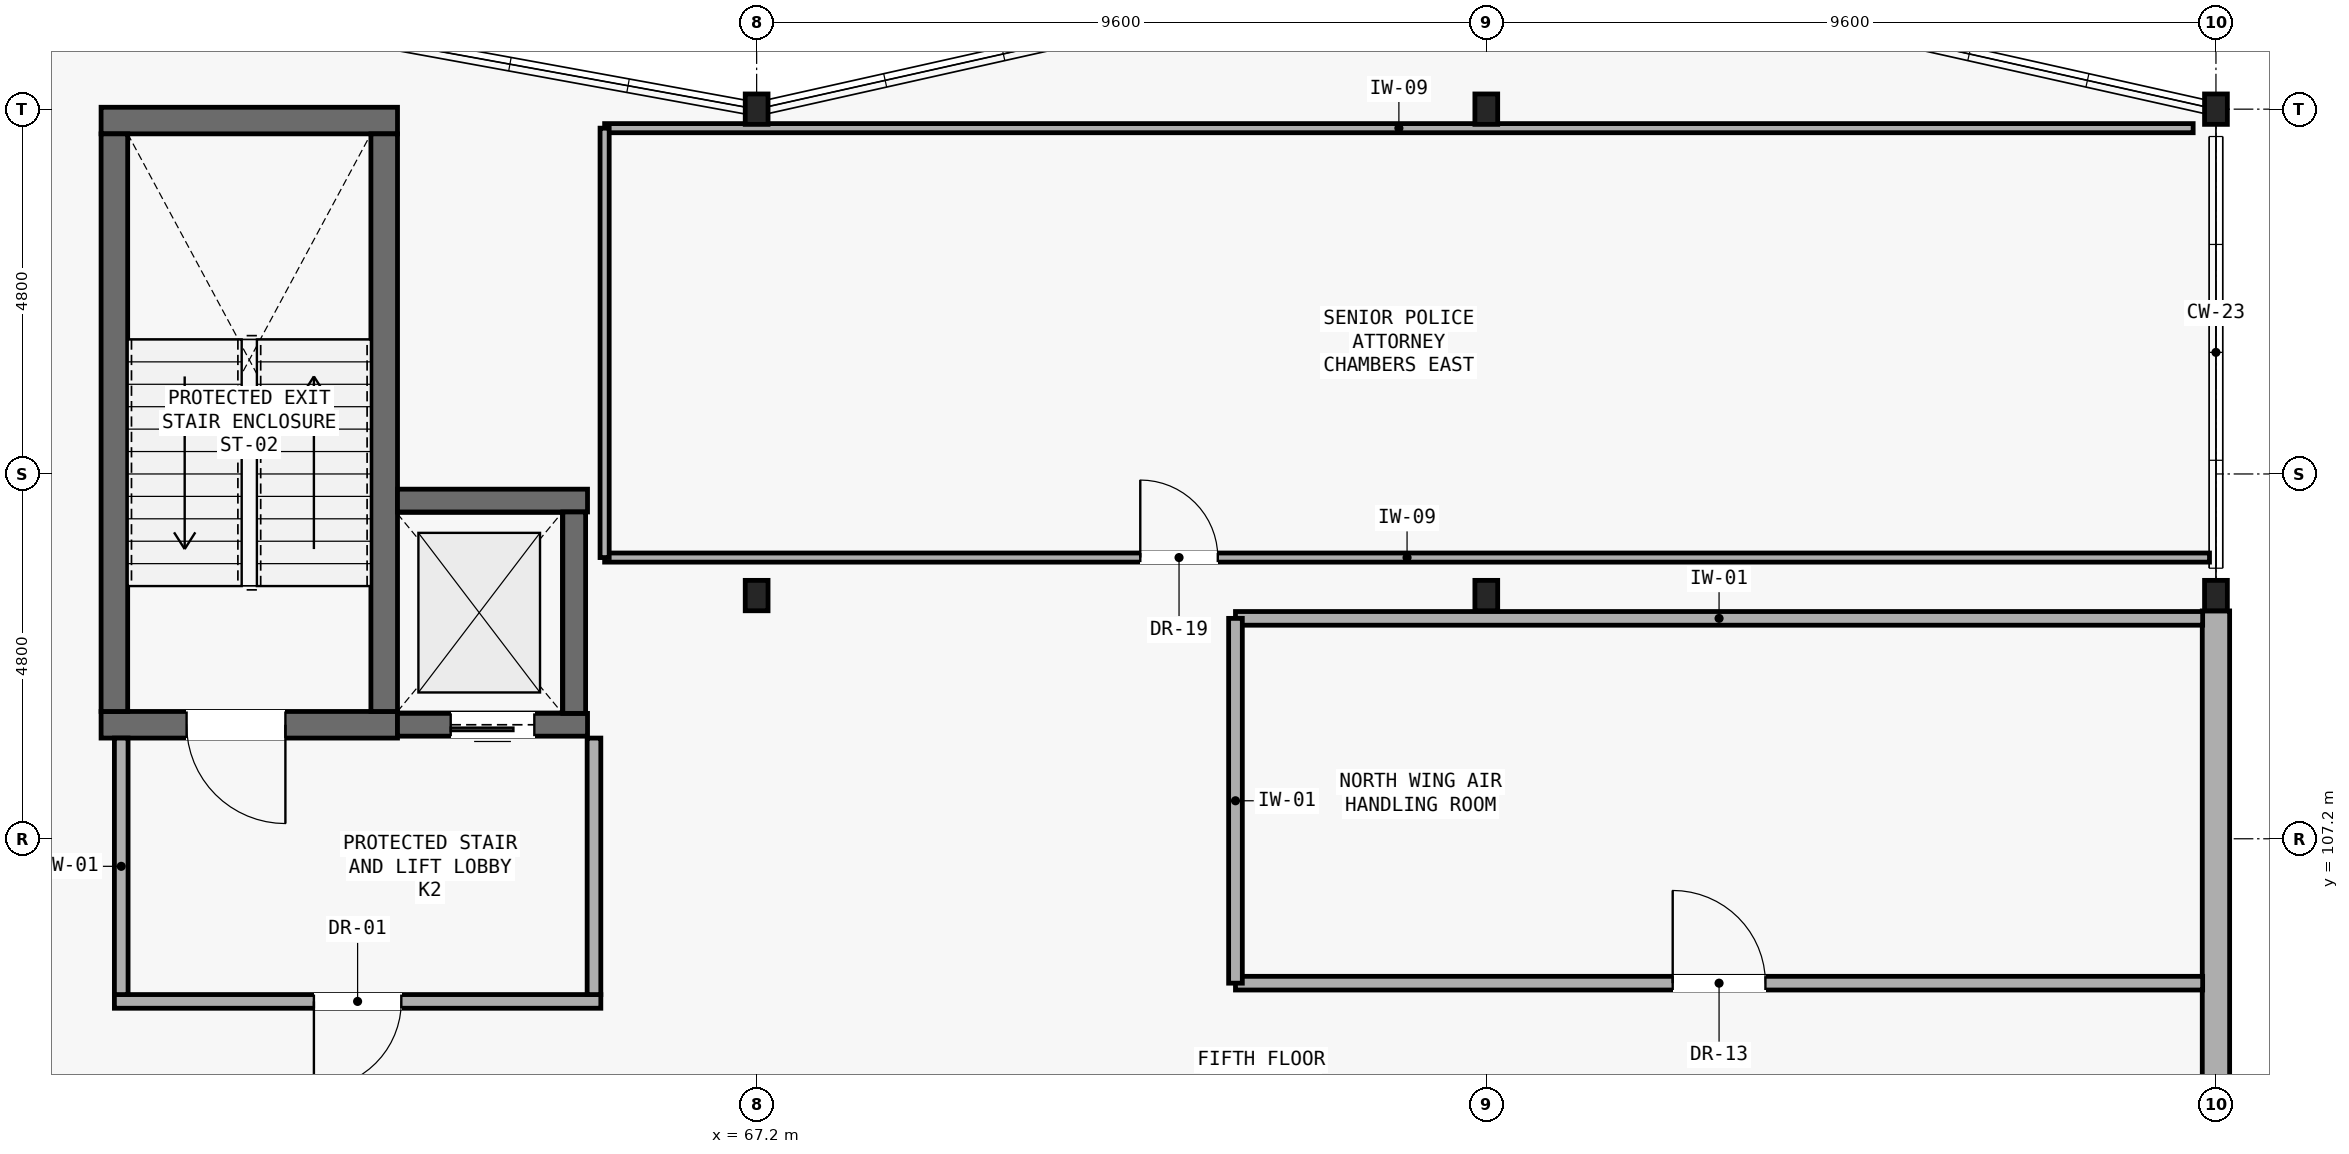
"""IFC4 building model, lengths in metres.
Left out: names, types, materials, properties, quantities, classifications, styles, units other than length and angle.
Written with IfcOpenShell. Run it as: python <this file> out.ifc"""

import sys

from ifc_helpers import new_model, si_unit, direction, frame, frame_2d, origin, origin_2d, place, context, subcontext, project, spatial, rectangle, i_section, extrude, element, fill, save


model = new_model("IFC4")
c1 = context("Model", 3, precision=1e-05, world=origin(), true_north=direction((0.0, 1.0)))
c2 = subcontext(c1, "Body", "Model", "MODEL_VIEW")
j1 = project(units=[si_unit("LENGTHUNIT", "METRE"), si_unit("PLANEANGLEUNIT", "RADIAN")], contexts=[c1])
p1 = place(None, origin())
s1 = spatial("IfcSite", under=j1, at=p1, CompositionType="ELEMENT")
p2 = place(p1, origin())
s2 = spatial("IfcBuilding", under=s1, at=p2, CompositionType="ELEMENT")
p3 = place(p2, frame((0.0, 0.0, 22.05)))
s3 = spatial("IfcBuildingStorey", under=s2, at=p3, CompositionType="ELEMENT", Elevation=22.05)
for number, where, z_axis, x_axis in (
    (1, (67.2, 110.4, 0.0), (0.0, 0.0, 1.0), (1.0, 0.0, 0.0)),
    (2, (67.2, 116.8, 0.0), (0.0, 0.0, 1.0), (1.0, 0.0, 0.0)),
    (3, (76.8, 110.4, 0.0), (0.0, 0.0, 1.0), (1.0, 0.0, 0.0)),
    (4, (76.8, 116.8, 0.0), (0.0, 0.0, 1.0), (1.0, 0.0, 0.0)),
    (5, (86.4, 110.4, 0.0), (0.0, 0.0, 1.0), (1.0, 0.0, 0.0)),
    (6, (86.4, 116.8, 0.0), (0.0, 0.0, 1.0), (1.0, 0.0, 0.0)),
):
    element("IfcColumn", number, at=place(p3, frame(where, z_axis=z_axis, x_axis=x_axis)), inside=s3, PredefinedType="COLUMN", context=c2, shape_type="SweptSolid", body=[
        extrude(i_section(OverallWidth=0.3, OverallDepth=0.4, WebThickness=0.013, FlangeThickness=0.024, FilletRadius=0.027, at=origin_2d()), origin(), (0.0, 0.0, 1.0), 4.2),
    ])
p4 = place(p3, frame((86.4, 102.802, 0.0), z_axis=(0.0, 0.0, 1.0), x_axis=(0.0, 1.0, 0.0)))
e7 = element("IfcWall", 7, at=p4, inside=s3, PredefinedType="SOLIDWALL", context=c2, shape_type="SweptSolid", body=[
    extrude(rectangle(XDim=7.396, YDim=0.36, at=frame_2d((3.698, 0.0))), origin(), (0.0, 0.0, 1.0), 3.505),
])
p5 = place(p3, frame((58.575, 108.7, 0.0), z_axis=(0.0, 0.0, 1.0), x_axis=(1.0, 0.0, 0.0)))
e8 = element("IfcWall", 8, at=p5, inside=s3, PredefinedType="SHEAR", context=c2, shape_type="SweptSolid", body=[
    extrude(rectangle(XDim=3.9, YDim=0.35, at=frame_2d((1.95, 0.0))), origin(), (0.0, 0.0, 1.0), 4.0),
])
p6 = place(p5, frame((1.125, 0.0, 0.0)))
e9 = element("IfcOpeningElement", 9, at=p6, cuts=e8, PredefinedType="OPENING", context=c2, shape_type="SweptSolid", body=[
    extrude(rectangle(XDim=1.3, YDim=2.15, at=frame_2d((0.65, 1.075))), frame((0.0, 0.185, 0.0), z_axis=(0.0, -1.0, 0.0), x_axis=(1.0, 0.0, 0.0)), (0.0, 0.0, 1.0), 0.37),
])
p7 = place(p3, frame((58.575, 116.65, 0.0), z_axis=(0.0, 0.0, 1.0), x_axis=(1.0, 0.0, 0.0)))
e10 = element("IfcWall", 10, at=p7, inside=s3, PredefinedType="SHEAR", context=c2, shape_type="SweptSolid", body=[
    extrude(rectangle(XDim=3.9, YDim=0.35, at=frame_2d((1.95, 0.0))), origin(), (0.0, 0.0, 1.0), 4.0),
])
for number, where, z_axis, x_axis in (
    (11, (58.75, 108.875, 0.0), (0.0, 0.0, 1.0), (0.0, 1.0, 0.0)),
    (12, (62.3, 108.875, 0.0), (0.0, 0.0, 1.0), (0.0, 1.0, 0.0)),
):
    element("IfcWall", number, at=place(p3, frame(where, z_axis=z_axis, x_axis=x_axis)), inside=s3, PredefinedType="SHEAR", context=c2, shape_type="SweptSolid", body=[
        extrude(rectangle(XDim=7.6, YDim=0.35, at=frame_2d((3.8, 0.0))), origin(), (0.0, 0.0, 1.0), 4.0),
    ])
p8 = place(p3, frame((62.475, 108.7, 0.0), z_axis=(0.0, 0.0, 1.0), x_axis=(1.0, 0.0, 0.0)))
e13 = element("IfcWall", 13, at=p8, inside=s3, PredefinedType="SHEAR", context=c2, shape_type="SweptSolid", body=[
    extrude(rectangle(XDim=2.5, YDim=0.3, at=frame_2d((1.25, 0.0))), origin(), (0.0, 0.0, 1.0), 4.0),
])
p9 = place(p8, frame((0.7, 0.0, 0.0)))
e14 = element("IfcOpeningElement", 14, at=p9, cuts=e13, PredefinedType="OPENING", context=c2, shape_type="SweptSolid", body=[
    extrude(rectangle(XDim=1.1, YDim=2.1, at=frame_2d((0.55, 1.05))), frame((0.0, 0.16, 0.0), z_axis=(0.0, -1.0, 0.0), x_axis=(1.0, 0.0, 0.0)), (0.0, 0.0, 1.0), 0.32),
])
p10 = place(p3, frame((62.475, 111.65, 0.0), z_axis=(0.0, 0.0, 1.0), x_axis=(1.0, 0.0, 0.0)))
e15 = element("IfcWall", 15, at=p10, inside=s3, PredefinedType="SHEAR", context=c2, shape_type="SweptSolid", body=[
    extrude(rectangle(XDim=2.5, YDim=0.3, at=frame_2d((1.25, 0.0))), origin(), (0.0, 0.0, 1.0), 4.0),
])
p11 = place(p3, frame((64.8, 108.85, 0.0), z_axis=(0.0, 0.0, 1.0), x_axis=(0.0, 1.0, 0.0)))
e16 = element("IfcWall", 16, at=p11, inside=s3, PredefinedType="SHEAR", context=c2, shape_type="SweptSolid", body=[
    extrude(rectangle(XDim=2.65, YDim=0.3, at=frame_2d((1.325, 0.0))), origin(), (0.0, 0.0, 1.0), 4.0),
])
p12 = place(p3, frame((58.75, 105.06, 0.0), z_axis=(0.0, 0.0, 1.0), x_axis=(1.0, 0.0, 0.0)))
e17 = element("IfcWall", 17, at=p12, inside=s3, PredefinedType="PARTITIONING", context=c2, shape_type="SweptSolid", body=[
    extrude(rectangle(XDim=6.4, YDim=0.18, at=frame_2d((3.2, 0.0))), origin(), (0.0, 0.0, 1.0), 3.62),
])
p13 = place(p12, frame((2.625, 0.0, 0.0)))
e18 = element("IfcOpeningElement", 18, at=p13, cuts=e17, PredefinedType="OPENING", context=c2, shape_type="SweptSolid", body=[
    extrude(rectangle(XDim=1.15, YDim=2.15, at=frame_2d((0.575, 1.075))), frame((0.0, 0.1, 0.0), z_axis=(0.0, -1.0, 0.0), x_axis=(1.0, 0.0, 0.0)), (0.0, 0.0, 1.0), 0.2),
])
for number, where, z_axis, x_axis in (
    (19, (58.84, 105.15, 0.0), (0.0, 0.0, 1.0), (0.0, 1.0, 0.0)),
    (20, (65.06, 105.15, 0.0), (0.0, 0.0, 1.0), (0.0, 1.0, 0.0)),
):
    element("IfcWall", number, at=place(p3, frame(where, z_axis=z_axis, x_axis=x_axis)), inside=s3, PredefinedType="PARTITIONING", context=c2, shape_type="SweptSolid", body=[
        extrude(rectangle(XDim=3.375, YDim=0.18, at=frame_2d((1.688, 0.0))), origin(), (0.0, 0.0, 1.0), 4.0),
    ])
p14 = place(p3, frame((65.2, 110.9, 0.0), z_axis=(0.0, 0.0, 1.0), x_axis=(1.0, 0.0, 0.0)))
e21 = element("IfcWall", 21, at=p14, inside=s3, PredefinedType="PARTITIONING", context=c2, shape_type="SweptSolid", body=[
    extrude(rectangle(XDim=21.115, YDim=0.12, at=frame_2d((10.558, 0.0))), origin(), (0.0, 0.0, 1.0), 4.0),
])
p15 = place(p14, frame((7.048, 0.0, 0.0)))
e22 = element("IfcOpeningElement", 22, at=p15, cuts=e21, PredefinedType="OPENING", context=c2, shape_type="SweptSolid", body=[
    extrude(rectangle(XDim=1.02, YDim=2.1, at=frame_2d((0.51, 1.05))), frame((0.0, 0.07, 0.0), z_axis=(0.0, -1.0, 0.0), x_axis=(1.0, 0.0, 0.0)), (0.0, 0.0, 1.0), 0.14),
])
p16 = place(p3, frame((86.1, 116.55, 0.0), z_axis=(0.0, 0.0, 1.0), x_axis=(-1.0, 0.0, 0.0)))
e23 = element("IfcWall", 23, at=p16, inside=s3, PredefinedType="PARTITIONING", context=c2, shape_type="SweptSolid", body=[
    extrude(rectangle(XDim=20.9, YDim=0.12, at=frame_2d((10.45, 0.0))), origin(), (0.0, 0.0, 1.0), 3.635),
])
p17 = place(p3, frame((65.2, 116.55, 0.0), z_axis=(0.0, 0.0, 1.0), x_axis=(0.0, -1.0, 0.0)))
e24 = element("IfcWall", 24, at=p17, inside=s3, PredefinedType="PARTITIONING", context=c2, shape_type="SweptSolid", body=[
    extrude(rectangle(XDim=5.65, YDim=0.12, at=frame_2d((2.825, 0.0))), origin(), (0.0, 0.0, 1.0), 4.0),
])
p18 = place(p3, frame((73.5, 105.3, 0.0), z_axis=(0.0, 0.0, 1.0), x_axis=(1.0, 0.0, 0.0)))
e25 = element("IfcWall", 25, at=p18, inside=s3, PredefinedType="PARTITIONING", context=c2, shape_type="SweptSolid", body=[
    extrude(rectangle(XDim=12.725, YDim=0.18, at=frame_2d((6.363, 0.0))), origin(), (0.0, 0.0, 1.0), 3.585),
])
p19 = place(p18, frame((5.752, 0.0, 0.0)))
e26 = element("IfcOpeningElement", 26, at=p19, cuts=e25, PredefinedType="OPENING", context=c2, shape_type="SweptSolid", body=[
    extrude(rectangle(XDim=1.22, YDim=2.1, at=frame_2d((0.61, 1.05))), frame((0.0, 0.1, 0.0), z_axis=(0.0, -1.0, 0.0), x_axis=(1.0, 0.0, 0.0)), (0.0, 0.0, 1.0), 0.2),
])
p20 = place(p3, frame((86.225, 110.1, 0.0), z_axis=(0.0, 0.0, 1.0), x_axis=(-1.0, 0.0, 0.0)))
e27 = element("IfcWall", 27, at=p20, inside=s3, PredefinedType="PARTITIONING", context=c2, shape_type="SweptSolid", body=[
    extrude(rectangle(XDim=12.725, YDim=0.18, at=frame_2d((6.363, 0.0))), origin(), (0.0, 0.0, 1.0), 3.405),
])
p21 = place(p3, frame((73.5, 110.1, 0.0), z_axis=(0.0, 0.0, 1.0), x_axis=(0.0, -1.0, 0.0)))
e28 = element("IfcWall", 28, at=p21, inside=s3, PredefinedType="PARTITIONING", context=c2, shape_type="SweptSolid", body=[
    extrude(rectangle(XDim=4.8, YDim=0.18, at=frame_2d((2.4, 0.0))), origin(), (0.0, 0.0, 1.0), 4.0),
])
p22 = place(p6, frame((1.3, 0.0, 0.0), z_axis=(0.0, 0.0, 1.0), x_axis=(-1.0, 0.0, 0.0)))
e29 = element("IfcDoor", 29, at=p22, inside=s3, OperationType="SINGLE_SWING_RIGHT", PredefinedType="DOOR", context=c2, shape_type="SweptSolid", body=[
    extrude(rectangle(XDim=1.3, YDim=2.15, at=frame_2d((0.65, 1.075))), frame((0.0, 0.025, 0.0), z_axis=(0.0, -1.0, 0.0), x_axis=(1.0, 0.0, 0.0)), (0.0, 0.0, 1.0), 0.05),
])
fill(e9, e29)
p23 = place(p9, frame((1.1, 0.0, 0.0), z_axis=(0.0, 0.0, 1.0), x_axis=(-1.0, 0.0, 0.0)))
e30 = element("IfcDoor", 30, at=p23, inside=s3, OperationType="SLIDING_TO_LEFT", PredefinedType="DOOR", context=c2, shape_type="SweptSolid", body=[
    extrude(rectangle(XDim=1.1, YDim=2.1, at=frame_2d((0.55, 1.05))), frame((0.0, 0.025, 0.0), z_axis=(0.0, -1.0, 0.0), x_axis=(1.0, 0.0, 0.0)), (0.0, 0.0, 1.0), 0.05),
])
fill(e14, e30)
p24 = place(p13, frame((1.15, 0.0, 0.0), z_axis=(0.0, 0.0, 1.0), x_axis=(-1.0, 0.0, 0.0)))
e31 = element("IfcDoor", 31, at=p24, inside=s3, OperationType="SINGLE_SWING_LEFT", PredefinedType="DOOR", context=c2, shape_type="SweptSolid", body=[
    extrude(rectangle(XDim=1.15, YDim=2.15, at=frame_2d((0.575, 1.075))), frame((0.0, 0.025, 0.0), z_axis=(0.0, -1.0, 0.0), x_axis=(1.0, 0.0, 0.0)), (0.0, 0.0, 1.0), 0.05),
])
fill(e18, e31)
p25 = place(p15, origin())
e32 = element("IfcDoor", 32, at=p25, inside=s3, OperationType="SINGLE_SWING_LEFT", PredefinedType="DOOR", context=c2, shape_type="SweptSolid", body=[
    extrude(rectangle(XDim=1.02, YDim=2.1, at=frame_2d((0.51, 1.05))), frame((0.0, 0.025, 0.0), z_axis=(0.0, -1.0, 0.0), x_axis=(1.0, 0.0, 0.0)), (0.0, 0.0, 1.0), 0.05),
])
fill(e22, e32)
p26 = place(p19, origin())
e33 = element("IfcDoor", 33, at=p26, inside=s3, OperationType="SINGLE_SWING_LEFT", PredefinedType="DOOR", context=c2, shape_type="SweptSolid", body=[
    extrude(rectangle(XDim=1.22, YDim=2.1, at=frame_2d((0.61, 1.05))), frame((0.0, 0.025, 0.0), z_axis=(0.0, -1.0, 0.0), x_axis=(1.0, 0.0, 0.0)), (0.0, 0.0, 1.0), 0.05),
])
fill(e26, e33)
save(model, sys.argv[1])
